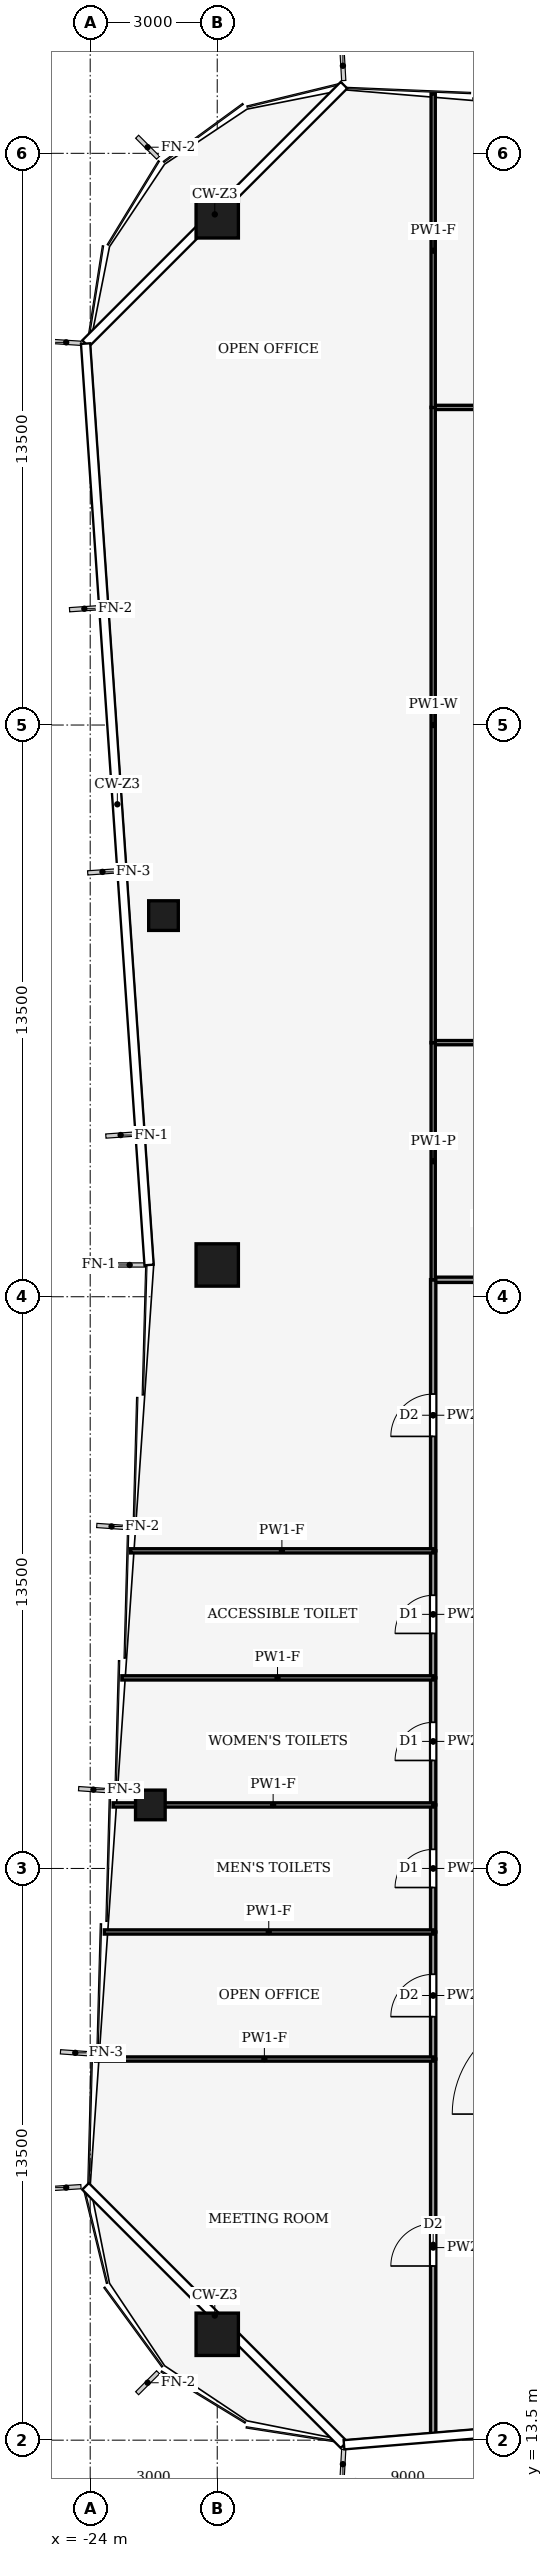
"""IFC4 building model, lengths in metres.
Left out: names, types, materials, properties, quantities, classifications, styles, units other than length and angle.
Written with IfcOpenShell. Run it as: python <this file> out.ifc"""

import sys

from ifc_helpers import new_model, si_unit, direction, frame, frame_2d, origin, origin_2d, place, context, subcontext, project, spatial, rectangle, hollow_rectangle, extrude, element, fill, save


model = new_model("IFC4")
c1 = context("Model", 3, precision=1e-05, world=origin(), true_north=direction((0.0, 1.0)))
c2 = subcontext(c1, "Body", "Model", "MODEL_VIEW")
j1 = project(units=[si_unit("LENGTHUNIT", "METRE"), si_unit("PLANEANGLEUNIT", "RADIAN")], contexts=[c1])
p1 = place(None, origin())
s1 = spatial("IfcSite", under=j1, at=p1, CompositionType="ELEMENT")
p2 = place(p1, origin())
s2 = spatial("IfcBuilding", under=s1, at=p2, CompositionType="ELEMENT")
p3 = place(p2, frame((0.0, 0.0, 218.0)))
s3 = spatial("IfcBuildingStorey", under=s2, at=p3, CompositionType="ELEMENT", Elevation=218.0)
for number, where, z_axis, x_axis in (
    (1, (-21.0, 66.0, 0.0), (0.0, 0.0, 1.0), (1.0, 0.0, 0.0)),
    (2, (-21.0, 16.0, 0.0), (0.0, 0.0, 1.0), (1.0, 0.0, 0.0)),
    (3, (-21.0, 41.25, 0.0), (0.0, 0.0, 1.0), (1.0, 0.0, 0.0)),
):
    element("IfcColumn", number, at=place(p3, frame(where, z_axis=z_axis, x_axis=x_axis)), inside=s3, PredefinedType="COLUMN", context=c2, shape_type="SweptSolid", body=[
        extrude(hollow_rectangle(XDim=1.0, YDim=1.0, WallThickness=0.06, at=origin_2d()), origin(), (0.0, 0.0, 1.0), 4.0),
    ])
for number, where, z_axis, x_axis in (
    (4, (-22.579, 28.5, 0.0), (0.0, 0.0, 1.0), (1.0, 0.0, 0.0)),
    (5, (-22.269, 49.5, 0.0), (0.0, 0.0, 1.0), (1.0, 0.0, 0.0)),
):
    element("IfcColumn", number, at=place(p3, frame(where, z_axis=z_axis, x_axis=x_axis)), inside=s3, PredefinedType="COLUMN", context=c2, shape_type="SweptSolid", body=[
        extrude(hollow_rectangle(XDim=0.7, YDim=0.7, WallThickness=0.03, at=origin_2d()), origin(), (0.0, 0.0, 1.0), 4.0),
    ])
p4 = place(p3, frame((-15.9, 40.9, 0.0), z_axis=(0.0, 0.0, 1.0), x_axis=(1.0, 0.0, 0.0)))
e6 = element("IfcWall", 6, at=p4, inside=s3, PredefinedType="PARTITIONING", context=c2, shape_type="SweptSolid", body=[
    extrude(rectangle(XDim=3.9, YDim=0.125, at=frame_2d((1.95, 0.0))), origin(), (0.0, 0.0, 1.0), 3.44),
])
p5 = place(p4, frame((1.45, 0.0, 0.0)))
e7 = element("IfcOpeningElement", 7, at=p5, cuts=e6, PredefinedType="OPENING", context=c2, shape_type="SweptSolid", body=[
    extrude(rectangle(XDim=1.0, YDim=2.1, at=frame_2d((0.5, 1.05))), frame((0.0, 0.073, 0.0), z_axis=(0.0, -1.0, 0.0), x_axis=(1.0, 0.0, 0.0)), (0.0, 0.0, 1.0), 0.145),
])
p6 = place(p3, frame((-15.9, 13.595, 0.0), z_axis=(0.0, 0.0, 1.0), x_axis=(0.0, 1.0, 0.0)))
e8 = element("IfcWall", 8, at=p6, inside=s3, PredefinedType="PARTITIONING", context=c2, shape_type="SweptSolid", body=[
    extrude(rectangle(XDim=8.905, YDim=0.125, at=frame_2d((4.453, 0.0))), origin(), (0.0, 0.0, 1.0), 3.04),
])
p7 = place(p6, frame((4.018, 0.0, 0.0)))
e9 = element("IfcOpeningElement", 9, at=p7, cuts=e8, PredefinedType="OPENING", context=c2, shape_type="SweptSolid", body=[
    extrude(rectangle(XDim=1.0, YDim=2.1, at=frame_2d((0.5, 1.05))), frame((0.0, 0.073, 0.0), z_axis=(0.0, -1.0, 0.0), x_axis=(1.0, 0.0, 0.0)), (0.0, 0.0, 1.0), 0.145),
])
p8 = place(p3, frame((-15.9, 22.5, 0.0), z_axis=(0.0, 0.0, 1.0), x_axis=(0.0, 1.0, 0.0)))
e10 = element("IfcWall", 10, at=p8, inside=s3, PredefinedType="PARTITIONING", context=c2, shape_type="SweptSolid", body=[
    extrude(rectangle(XDim=3.0, YDim=0.125, at=frame_2d((1.5, 0.0))), origin(), (0.0, 0.0, 1.0), 3.44),
])
p9 = place(p8, frame((1.0, 0.0, 0.0)))
e11 = element("IfcOpeningElement", 11, at=p9, cuts=e10, PredefinedType="OPENING", context=c2, shape_type="SweptSolid", body=[
    extrude(rectangle(XDim=1.0, YDim=2.1, at=frame_2d((0.5, 1.05))), frame((0.0, 0.073, 0.0), z_axis=(0.0, -1.0, 0.0), x_axis=(1.0, 0.0, 0.0)), (0.0, 0.0, 1.0), 0.145),
])
p10 = place(p3, frame((-15.9, 25.5, 0.0), z_axis=(0.0, 0.0, 1.0), x_axis=(0.0, 1.0, 0.0)))
e12 = element("IfcWall", 12, at=p10, inside=s3, PredefinedType="PARTITIONING", context=c2, shape_type="SweptSolid", body=[
    extrude(rectangle(XDim=3.0, YDim=0.125, at=frame_2d((1.5, 0.0))), origin(), (0.0, 0.0, 1.0), 3.87),
])
p11 = place(p10, frame((1.05, 0.0, 0.0)))
e13 = element("IfcOpeningElement", 13, at=p11, cuts=e12, PredefinedType="OPENING", context=c2, shape_type="SweptSolid", body=[
    extrude(rectangle(XDim=0.9, YDim=2.1, at=frame_2d((0.45, 1.05))), frame((0.0, 0.073, 0.0), z_axis=(0.0, -1.0, 0.0), x_axis=(1.0, 0.0, 0.0)), (0.0, 0.0, 1.0), 0.145),
])
p12 = place(p3, frame((-15.9, 28.5, 0.0), z_axis=(0.0, 0.0, 1.0), x_axis=(0.0, 1.0, 0.0)))
e14 = element("IfcWall", 14, at=p12, inside=s3, PredefinedType="PARTITIONING", context=c2, shape_type="SweptSolid", body=[
    extrude(rectangle(XDim=3.0, YDim=0.125, at=frame_2d((1.5, 0.0))), origin(), (0.0, 0.0, 1.0), 3.87),
])
p13 = place(p12, frame((1.05, 0.0, 0.0)))
e15 = element("IfcOpeningElement", 15, at=p13, cuts=e14, PredefinedType="OPENING", context=c2, shape_type="SweptSolid", body=[
    extrude(rectangle(XDim=0.9, YDim=2.1, at=frame_2d((0.45, 1.05))), frame((0.0, 0.073, 0.0), z_axis=(0.0, -1.0, 0.0), x_axis=(1.0, 0.0, 0.0)), (0.0, 0.0, 1.0), 0.145),
])
p14 = place(p3, frame((-15.9, 31.5, 0.0), z_axis=(0.0, 0.0, 1.0), x_axis=(0.0, 1.0, 0.0)))
e16 = element("IfcWall", 16, at=p14, inside=s3, PredefinedType="PARTITIONING", context=c2, shape_type="SweptSolid", body=[
    extrude(rectangle(XDim=3.0, YDim=0.125, at=frame_2d((1.5, 0.0))), origin(), (0.0, 0.0, 1.0), 3.87),
])
p15 = place(p14, frame((1.05, 0.0, 0.0)))
e17 = element("IfcOpeningElement", 17, at=p15, cuts=e16, PredefinedType="OPENING", context=c2, shape_type="SweptSolid", body=[
    extrude(rectangle(XDim=0.9, YDim=2.1, at=frame_2d((0.45, 1.05))), frame((0.0, 0.073, 0.0), z_axis=(0.0, -1.0, 0.0), x_axis=(1.0, 0.0, 0.0)), (0.0, 0.0, 1.0), 0.145),
])
p16 = place(p3, frame((-15.9, 34.5, 0.0), z_axis=(0.0, 0.0, 1.0), x_axis=(0.0, 1.0, 0.0)))
e18 = element("IfcWall", 18, at=p16, inside=s3, PredefinedType="PARTITIONING", context=c2, shape_type="SweptSolid", body=[
    extrude(rectangle(XDim=6.404, YDim=0.125, at=frame_2d((3.202, 0.0))), origin(), (0.0, 0.0, 1.0), 3.14),
])
p17 = place(p16, frame((2.702, 0.0, 0.0)))
e19 = element("IfcOpeningElement", 19, at=p17, cuts=e18, PredefinedType="OPENING", context=c2, shape_type="SweptSolid", body=[
    extrude(rectangle(XDim=1.0, YDim=2.1, at=frame_2d((0.5, 1.05))), frame((0.0, 0.073, 0.0), z_axis=(0.0, -1.0, 0.0), x_axis=(1.0, 0.0, 0.0)), (0.0, 0.0, 1.0), 0.145),
])
p18 = place(p3, frame((-11.996, 46.5, 0.0), z_axis=(0.0, 0.0, 1.0), x_axis=(-1.0, 0.0, 0.0)))
e20 = element("IfcWall", 20, at=p18, inside=s3, PredefinedType="PARTITIONING", context=c2, shape_type="SweptSolid", body=[
    extrude(rectangle(XDim=3.904, YDim=0.1, at=frame_2d((1.952, 0.0))), origin(), (0.0, 0.0, 1.0), 3.87),
])
p19 = place(p3, frame((-15.9, 46.504, 0.0), z_axis=(0.0, 0.0, 1.0), x_axis=(0.0, -1.0, 0.0)))
e21 = element("IfcWall", 21, at=p19, inside=s3, PredefinedType="PARTITIONING", context=c2, shape_type="SweptSolid", body=[
    extrude(rectangle(XDim=5.608, YDim=0.1, at=frame_2d((2.804, 0.0))), origin(), (0.0, 0.0, 1.0), 3.44),
])
p20 = place(p3, frame((-15.9, 61.5, 0.0), z_axis=(0.0, 0.0, 1.0), x_axis=(1.0, 0.0, 0.0)))
e22 = element("IfcWall", 22, at=p20, inside=s3, PredefinedType="PARTITIONING", context=c2, shape_type="SweptSolid", body=[
    extrude(rectangle(XDim=9.9, YDim=0.1, at=frame_2d((4.95, 0.0))), origin(), (0.0, 0.0, 1.0), 3.24),
])
p21 = place(p20, frame((4.45, 0.0, 0.0)))
e23 = element("IfcOpeningElement", 23, at=p21, cuts=e22, PredefinedType="OPENING", context=c2, shape_type="SweptSolid", body=[
    extrude(rectangle(XDim=1.0, YDim=2.1, at=frame_2d((0.5, 1.05))), frame((0.0, 0.06, 0.0), z_axis=(0.0, -1.0, 0.0), x_axis=(1.0, 0.0, 0.0)), (0.0, 0.0, 1.0), 0.12),
])
p22 = place(p3, frame((-15.9, 61.504, 0.0), z_axis=(0.0, 0.0, 1.0), x_axis=(0.0, -1.0, 0.0)))
e24 = element("IfcWall", 24, at=p22, inside=s3, PredefinedType="PARTITIONING", context=c2, shape_type="SweptSolid", body=[
    extrude(rectangle(XDim=15.008, YDim=0.1, at=frame_2d((7.504, 0.0))), origin(), (0.0, 0.0, 1.0), 3.24),
])
p23 = place(p3, frame((-15.9, 68.905, 0.0), z_axis=(0.0, 0.0, 1.0), x_axis=(0.0, -1.0, 0.0)))
e25 = element("IfcWall", 25, at=p23, inside=s3, PredefinedType="PARTITIONING", context=c2, shape_type="SweptSolid", body=[
    extrude(rectangle(XDim=7.409, YDim=0.1, at=frame_2d((3.705, 0.0))), origin(), (0.0, 0.0, 1.0), 3.04),
])
p24 = place(p3, frame((-15.9, 22.5, 0.0), z_axis=(0.0, 0.0, 1.0), x_axis=(-1.0, 0.0, 0.0)))
e26 = element("IfcWall", 26, at=p24, inside=s3, PredefinedType="PARTITIONING", context=c2, shape_type="SweptSolid", body=[
    extrude(rectangle(XDim=7.973, YDim=0.1, at=frame_2d((3.987, 0.0))), origin(), (0.0, 0.0, 1.0), 3.04),
])
p25 = place(p3, frame((-15.9, 25.5, 0.0), z_axis=(0.0, 0.0, 1.0), x_axis=(-1.0, 0.0, 0.0)))
e27 = element("IfcWall", 27, at=p25, inside=s3, PredefinedType="PARTITIONING", context=c2, shape_type="SweptSolid", body=[
    extrude(rectangle(XDim=7.766, YDim=0.1, at=frame_2d((3.883, 0.0))), origin(), (0.0, 0.0, 1.0), 3.04),
])
p26 = place(p3, frame((-15.9, 28.5, 0.0), z_axis=(0.0, 0.0, 1.0), x_axis=(-1.0, 0.0, 0.0)))
e28 = element("IfcWall", 28, at=p26, inside=s3, PredefinedType="PARTITIONING", context=c2, shape_type="SweptSolid", body=[
    extrude(rectangle(XDim=7.559, YDim=0.1, at=frame_2d((3.78, 0.0))), origin(), (0.0, 0.0, 1.0), 3.04),
])
p27 = place(p3, frame((-15.9, 31.5, 0.0), z_axis=(0.0, 0.0, 1.0), x_axis=(-1.0, 0.0, 0.0)))
e29 = element("IfcWall", 29, at=p27, inside=s3, PredefinedType="PARTITIONING", context=c2, shape_type="SweptSolid", body=[
    extrude(rectangle(XDim=7.353, YDim=0.1, at=frame_2d((3.676, 0.0))), origin(), (0.0, 0.0, 1.0), 3.04),
])
p28 = place(p3, frame((-15.9, 34.5, 0.0), z_axis=(0.0, 0.0, 1.0), x_axis=(-1.0, 0.0, 0.0)))
e30 = element("IfcWall", 30, at=p28, inside=s3, PredefinedType="PARTITIONING", context=c2, shape_type="SweptSolid", body=[
    extrude(rectangle(XDim=7.146, YDim=0.1, at=frame_2d((3.573, 0.0))), origin(), (0.0, 0.0, 1.0), 3.04),
])
p29 = place(p7, origin())
e31 = element("IfcDoor", 31, at=p29, inside=s3, OperationType="SINGLE_SWING_RIGHT", PredefinedType="DOOR", context=c2, shape_type="SweptSolid", body=[
    extrude(rectangle(XDim=1.0, YDim=2.1, at=frame_2d((0.5, 1.05))), frame((0.0, 0.025, 0.0), z_axis=(0.0, -1.0, 0.0), x_axis=(1.0, 0.0, 0.0)), (0.0, 0.0, 1.0), 0.05),
])
fill(e9, e31)
p30 = place(p9, origin())
e32 = element("IfcDoor", 32, at=p30, inside=s3, OperationType="SINGLE_SWING_LEFT", PredefinedType="DOOR", context=c2, shape_type="SweptSolid", body=[
    extrude(rectangle(XDim=1.0, YDim=2.1, at=frame_2d((0.5, 1.05))), frame((0.0, 0.025, 0.0), z_axis=(0.0, -1.0, 0.0), x_axis=(1.0, 0.0, 0.0)), (0.0, 0.0, 1.0), 0.05),
])
fill(e11, e32)
p31 = place(p11, origin())
e33 = element("IfcDoor", 33, at=p31, inside=s3, OperationType="SINGLE_SWING_RIGHT", PredefinedType="DOOR", context=c2, shape_type="SweptSolid", body=[
    extrude(rectangle(XDim=0.9, YDim=2.1, at=frame_2d((0.45, 1.05))), frame((0.0, 0.025, 0.0), z_axis=(0.0, -1.0, 0.0), x_axis=(1.0, 0.0, 0.0)), (0.0, 0.0, 1.0), 0.05),
])
fill(e13, e33)
p32 = place(p13, origin())
e34 = element("IfcDoor", 34, at=p32, inside=s3, OperationType="SINGLE_SWING_LEFT", PredefinedType="DOOR", context=c2, shape_type="SweptSolid", body=[
    extrude(rectangle(XDim=0.9, YDim=2.1, at=frame_2d((0.45, 1.05))), frame((0.0, 0.025, 0.0), z_axis=(0.0, -1.0, 0.0), x_axis=(1.0, 0.0, 0.0)), (0.0, 0.0, 1.0), 0.05),
])
fill(e15, e34)
p33 = place(p15, origin())
e35 = element("IfcDoor", 35, at=p33, inside=s3, OperationType="SINGLE_SWING_RIGHT", PredefinedType="DOOR", context=c2, shape_type="SweptSolid", body=[
    extrude(rectangle(XDim=0.9, YDim=2.1, at=frame_2d((0.45, 1.05))), frame((0.0, 0.025, 0.0), z_axis=(0.0, -1.0, 0.0), x_axis=(1.0, 0.0, 0.0)), (0.0, 0.0, 1.0), 0.05),
])
fill(e17, e35)
p34 = place(p17, origin())
e36 = element("IfcDoor", 36, at=p34, inside=s3, OperationType="SINGLE_SWING_LEFT", PredefinedType="DOOR", context=c2, shape_type="SweptSolid", body=[
    extrude(rectangle(XDim=1.0, YDim=2.1, at=frame_2d((0.5, 1.05))), frame((0.0, 0.025, 0.0), z_axis=(0.0, -1.0, 0.0), x_axis=(1.0, 0.0, 0.0)), (0.0, 0.0, 1.0), 0.05),
])
fill(e19, e36)
save(model, sys.argv[1])
